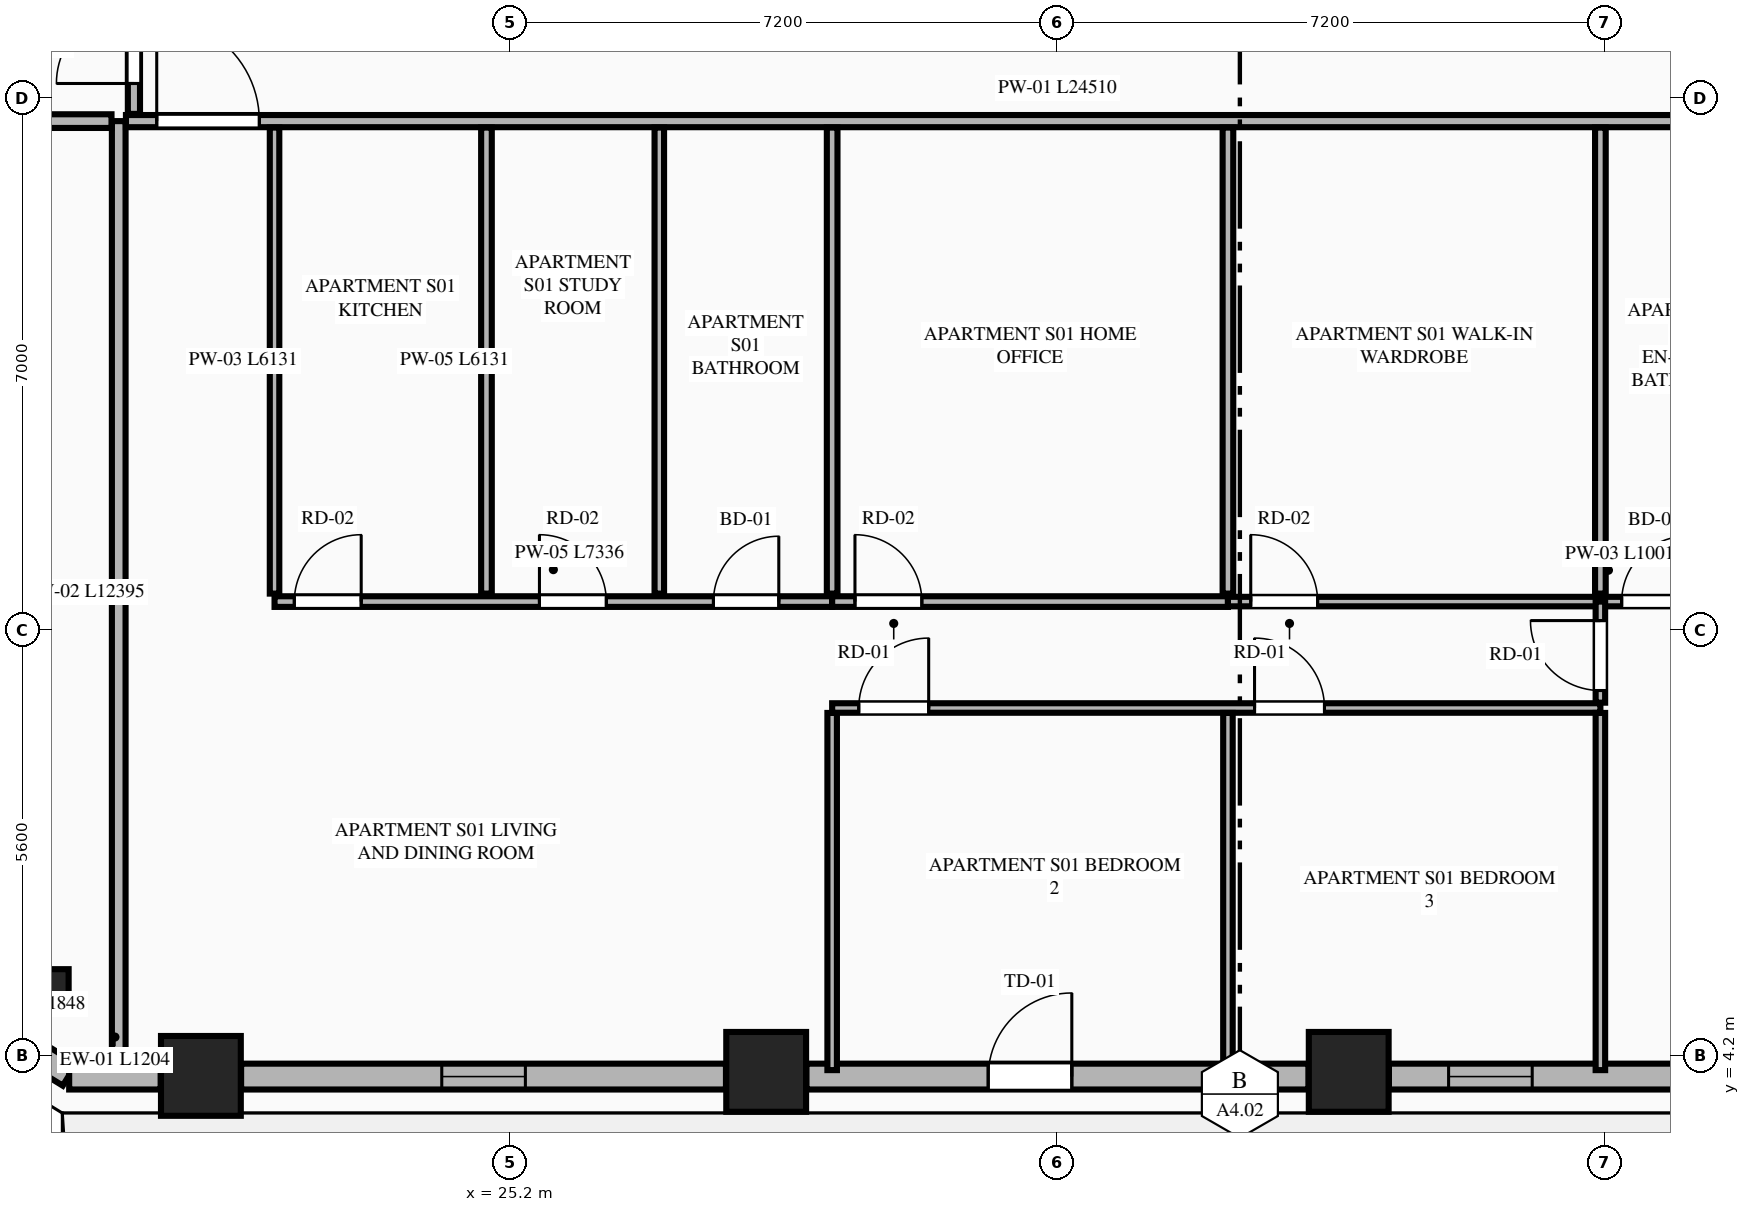
"""IFC4 building model, lengths in metres.
Left out: names, types, materials, properties, quantities, classifications, styles, units other than length and angle.
Written with IfcOpenShell. Run it as: python <this file> out.ifc"""

import sys

from ifc_helpers import new_model, si_unit, direction, frame, frame_2d, origin, origin_2d, place, context, subcontext, project, spatial, rectangle, extrude, element, fill, save


model = new_model("IFC4")
c1 = context("Model", 3, precision=1e-05, world=origin(), true_north=direction((0.0, 1.0)))
c2 = subcontext(c1, "Body", "Model", "MODEL_VIEW")
j1 = project(units=[si_unit("LENGTHUNIT", "METRE"), si_unit("PLANEANGLEUNIT", "RADIAN")], contexts=[c1])
p1 = place(None, origin())
s1 = spatial("IfcSite", under=j1, at=p1, CompositionType="ELEMENT")
p2 = place(p1, origin())
s2 = spatial("IfcBuilding", under=s1, at=p2, CompositionType="ELEMENT")
p3 = place(p2, frame((0.0, 0.0, 119.7)))
s3 = spatial("IfcBuildingStorey", under=s2, at=p3, CompositionType="ELEMENT", Elevation=119.7)
for number, where, z_axis, x_axis in (
    (1, (21.131, 3.939, 0.0), (0.0, 0.0, 1.0), (1.0, 0.0, 0.0)),
    (2, (28.568, 3.992, 0.0), (0.0, 0.0, 1.0), (1.0, 0.0, 0.0)),
    (3, (36.232, 3.992, 0.0), (0.0, 0.0, 1.0), (1.0, 0.0, 0.0)),
):
    element("IfcColumn", number, at=place(p3, frame(where, z_axis=z_axis, x_axis=x_axis)), inside=s3, PredefinedType="COLUMN", context=c2, shape_type="SweptSolid", body=[
        extrude(rectangle(XDim=1.05, YDim=1.05, at=origin_2d()), origin(), (0.0, 0.0, 1.0), 3.55),
    ])
p4 = place(p3, frame((19.141, 5.093, 0.0), z_axis=(0.0, 0.0, 1.0), x_axis=(0.865160173452, -0.501495637342, 0.0)))
e4 = element("IfcColumn", 4, at=p4, inside=s3, PredefinedType="PILASTER", context=c2, shape_type="SweptSolid", body=[
    extrude(rectangle(XDim=0.5, YDim=0.35, at=origin_2d()), origin(), (0.0, 0.0, 1.0), 3.55),
])
p5 = place(p3, frame((17.829, 4.923, 0.0), z_axis=(0.0, 0.0, 1.0), x_axis=(0.851798915137, -0.523868884523, 0.0)))
e5 = element("IfcWall", 5, at=p5, inside=s3, PredefinedType="STANDARD", context=c2, shape_type="SweptSolid", body=[
    extrude(rectangle(XDim=1.848, YDim=0.34, at=frame_2d((0.924, 0.0))), origin(), (0.0, 0.0, 1.0), 3.34),
])
p6 = place(p3, frame((19.398, 3.93, 0.0), z_axis=(0.0, 0.0, 1.0), x_axis=(1.0, 0.0, 0.0)))
e6 = element("IfcWall", 6, at=p6, inside=s3, PredefinedType="STANDARD", context=c2, shape_type="SweptSolid", body=[
    extrude(rectangle(XDim=1.204, YDim=0.34, at=frame_2d((0.602, 0.0))), origin(), (0.0, 0.0, 1.0), 3.34),
])
p7 = place(p3, frame((21.66, 3.93, 0.0), z_axis=(0.0, 0.0, 1.0), x_axis=(1.0, 0.0, 0.0)))
e7 = element("IfcWall", 7, at=p7, inside=s3, PredefinedType="STANDARD", context=c2, shape_type="SweptSolid", body=[
    extrude(rectangle(XDim=6.379, YDim=0.34, at=frame_2d((3.189, 0.0))), origin(), (0.0, 0.0, 1.0), 2.797),
])
p8 = place(p7, frame((2.64, 0.0, 0.75)))
e8 = element("IfcOpeningElement", 8, at=p8, cuts=e7, PredefinedType="OPENING", context=c2, shape_type="SweptSolid", body=[
    extrude(rectangle(XDim=1.1, YDim=1.897, at=frame_2d((0.55, 0.948))), frame((0.0, 0.18, 0.0), z_axis=(0.0, -1.0, 0.0), x_axis=(1.0, 0.0, 0.0)), (0.0, 0.0, 1.0), 0.36),
])
p9 = place(p3, frame((29.097, 3.93, 0.0), z_axis=(0.0, 0.0, 1.0), x_axis=(1.0, 0.0, 0.0)))
e9 = element("IfcWall", 9, at=p9, inside=s3, PredefinedType="STANDARD", context=c2, shape_type="SweptSolid", body=[
    extrude(rectangle(XDim=6.606, YDim=0.34, at=frame_2d((3.303, 0.0))), origin(), (0.0, 0.0, 1.0), 2.797),
])
p10 = place(p9, frame((2.392, 0.0, 0.0)))
e10 = element("IfcOpeningElement", 10, at=p10, cuts=e9, PredefinedType="OPENING", context=c2, shape_type="SweptSolid", body=[
    extrude(rectangle(XDim=1.1, YDim=2.25, at=frame_2d((0.55, 1.125))), frame((0.0, 0.18, 0.0), z_axis=(0.0, -1.0, 0.0), x_axis=(1.0, 0.0, 0.0)), (0.0, 0.0, 1.0), 0.36),
])
p11 = place(p3, frame((36.761, 3.93, 0.0), z_axis=(0.0, 0.0, 1.0), x_axis=(1.0, 0.0, 0.0)))
e11 = element("IfcWall", 11, at=p11, inside=s3, PredefinedType="STANDARD", context=c2, shape_type="SweptSolid", body=[
    extrude(rectangle(XDim=6.379, YDim=0.34, at=frame_2d((3.189, 0.0))), origin(), (0.0, 0.0, 1.0), 2.797),
])
p12 = place(p11, frame((0.785, 0.0, 0.75)))
e12 = element("IfcOpeningElement", 12, at=p12, cuts=e11, PredefinedType="OPENING", context=c2, shape_type="SweptSolid", body=[
    extrude(rectangle(XDim=1.1, YDim=1.897, at=frame_2d((0.55, 0.948))), frame((0.0, 0.18, 0.0), z_axis=(0.0, -1.0, 0.0), x_axis=(1.0, 0.0, 0.0)), (0.0, 0.0, 1.0), 0.36),
])
p13 = place(p11, frame((4.087, 0.0, 0.75)))
e13 = element("IfcOpeningElement", 13, at=p13, cuts=e11, PredefinedType="OPENING", context=c2, shape_type="SweptSolid", body=[
    extrude(rectangle(XDim=1.1, YDim=1.897, at=frame_2d((0.55, 0.948))), frame((0.0, 0.18, 0.0), z_axis=(0.0, -1.0, 0.0), x_axis=(1.0, 0.0, 0.0)), (0.0, 0.0, 1.0), 0.36),
])
p14 = place(p3, frame((20.05, 4.105, 0.0), z_axis=(0.0, 0.0, 1.0), x_axis=(0.0, 1.0, 0.0)))
e14 = element("IfcWall", 14, at=p14, inside=s3, PredefinedType="PARTITIONING", context=c2, shape_type="SweptSolid", body=[
    extrude(rectangle(XDim=12.395, YDim=0.18, at=frame_2d((6.198, 0.0))), origin(), (0.0, 0.0, 1.0), 3.34),
])
p15 = place(p3, frame((20.145, 16.5, 0.0), z_axis=(0.0, 0.0, 1.0), x_axis=(1.0, 0.0, 0.0)))
e15 = element("IfcWall", 15, at=p15, inside=s3, PredefinedType="PARTITIONING", context=c2, shape_type="SweptSolid", body=[
    extrude(rectangle(XDim=24.51, YDim=0.16, at=frame_2d((12.255, 0.0))), origin(), (0.0, 0.0, 1.0), 3.34),
])
p16 = place(p15, frame((0.405, 0.0, 0.0)))
e16 = element("IfcOpeningElement", 16, at=p16, cuts=e15, PredefinedType="OPENING", context=c2, shape_type="SweptSolid", body=[
    extrude(rectangle(XDim=1.35, YDim=2.35, at=frame_2d((0.675, 1.175))), frame((0.0, 0.09, 0.0), z_axis=(0.0, -1.0, 0.0), x_axis=(1.0, 0.0, 0.0)), (0.0, 0.0, 1.0), 0.18),
])
p17 = place(p3, frame((22.1, 10.284, 0.0), z_axis=(0.0, 0.0, 1.0), x_axis=(0.0, 1.0, 0.0)))
e17 = element("IfcWall", 17, at=p17, inside=s3, PredefinedType="PARTITIONING", context=c2, shape_type="SweptSolid", body=[
    extrude(rectangle(XDim=6.131, YDim=0.125, at=frame_2d((3.065, 0.0))), origin(), (0.0, 0.0, 1.0), 2.722),
])
p18 = place(p3, frame((22.1, 10.179, 0.0), z_axis=(0.0, 0.0, 1.0), x_axis=(1.0, 0.0, 0.0)))
e18 = element("IfcWall", 18, at=p18, inside=s3, PredefinedType="PLUMBINGWALL", context=c2, shape_type="SweptSolid", body=[
    extrude(rectangle(XDim=7.336, YDim=0.14, at=frame_2d((3.668, 0.0))), origin(), (0.0, 0.0, 1.0), 3.34),
])
p19 = place(p18, frame((5.774, 0.0, 0.0)))
e19 = element("IfcOpeningElement", 19, at=p19, cuts=e18, PredefinedType="OPENING", context=c2, shape_type="SweptSolid", body=[
    extrude(rectangle(XDim=0.86, YDim=2.1, at=frame_2d((0.43, 1.05))), frame((0.0, 0.08, 0.0), z_axis=(0.0, -1.0, 0.0), x_axis=(1.0, 0.0, 0.0)), (0.0, 0.0, 1.0), 0.16),
])
p20 = place(p18, frame((0.26, 0.0, 0.0)))
e20 = element("IfcOpeningElement", 20, at=p20, cuts=e18, PredefinedType="OPENING", context=c2, shape_type="SweptSolid", body=[
    extrude(rectangle(XDim=0.88, YDim=2.15, at=frame_2d((0.44, 1.075))), frame((0.0, 0.08, 0.0), z_axis=(0.0, -1.0, 0.0), x_axis=(1.0, 0.0, 0.0)), (0.0, 0.0, 1.0), 0.16),
])
p21 = place(p18, frame((3.485, 0.0, 0.0)))
e21 = element("IfcOpeningElement", 21, at=p21, cuts=e18, PredefinedType="OPENING", context=c2, shape_type="SweptSolid", body=[
    extrude(rectangle(XDim=0.88, YDim=2.15, at=frame_2d((0.44, 1.075))), frame((0.0, 0.08, 0.0), z_axis=(0.0, -1.0, 0.0), x_axis=(1.0, 0.0, 0.0)), (0.0, 0.0, 1.0), 0.16),
])
p22 = place(p3, frame((29.436, 10.179, 0.0), z_axis=(0.0, 0.0, 1.0), x_axis=(1.0, 0.0, 0.0)))
e22 = element("IfcWall", 22, at=p22, inside=s3, PredefinedType="PLUMBINGWALL", context=c2, shape_type="SweptSolid", body=[
    extrude(rectangle(XDim=5.207, YDim=0.14, at=frame_2d((2.604, 0.0))), origin(), (0.0, 0.0, 1.0), 3.34),
])
p23 = place(p22, frame((0.3, 0.0, 0.0)))
e23 = element("IfcOpeningElement", 23, at=p23, cuts=e22, PredefinedType="OPENING", context=c2, shape_type="SweptSolid", body=[
    extrude(rectangle(XDim=0.88, YDim=2.15, at=frame_2d((0.44, 1.075))), frame((0.0, 0.08, 0.0), z_axis=(0.0, -1.0, 0.0), x_axis=(1.0, 0.0, 0.0)), (0.0, 0.0, 1.0), 0.16),
])
p24 = place(p3, frame((34.643, 10.179, 0.0), z_axis=(0.0, 0.0, 1.0), x_axis=(1.0, 0.0, 0.0)))
e24 = element("IfcWall", 24, at=p24, inside=s3, PredefinedType="PARTITIONING", context=c2, shape_type="SweptSolid", body=[
    extrude(rectangle(XDim=10.012, YDim=0.125, at=frame_2d((5.006, 0.0))), origin(), (0.0, 0.0, 1.0), 3.34),
])
p25 = place(p24, frame((5.18, 0.0, 0.0)))
e25 = element("IfcOpeningElement", 25, at=p25, cuts=e24, PredefinedType="OPENING", context=c2, shape_type="SweptSolid", body=[
    extrude(rectangle(XDim=0.86, YDim=2.1, at=frame_2d((0.43, 1.05))), frame((0.0, 0.073, 0.0), z_axis=(0.0, -1.0, 0.0), x_axis=(1.0, 0.0, 0.0)), (0.0, 0.0, 1.0), 0.145),
])
p26 = place(p24, frame((7.42, 0.0, 0.0)))
e26 = element("IfcOpeningElement", 26, at=p26, cuts=e24, PredefinedType="OPENING", context=c2, shape_type="SweptSolid", body=[
    extrude(rectangle(XDim=0.88, YDim=2.15, at=frame_2d((0.44, 1.075))), frame((0.0, 0.073, 0.0), z_axis=(0.0, -1.0, 0.0), x_axis=(1.0, 0.0, 0.0)), (0.0, 0.0, 1.0), 0.145),
])
p27 = place(p24, frame((0.3, 0.0, 0.0)))
e27 = element("IfcOpeningElement", 27, at=p27, cuts=e24, PredefinedType="OPENING", context=c2, shape_type="SweptSolid", body=[
    extrude(rectangle(XDim=0.88, YDim=2.15, at=frame_2d((0.44, 1.075))), frame((0.0, 0.073, 0.0), z_axis=(0.0, -1.0, 0.0), x_axis=(1.0, 0.0, 0.0)), (0.0, 0.0, 1.0), 0.145),
])
p28 = place(p3, frame((24.888, 10.284, 0.0), z_axis=(0.0, 0.0, 1.0), x_axis=(0.0, 1.0, 0.0)))
e28 = element("IfcWall", 28, at=p28, inside=s3, PredefinedType="PLUMBINGWALL", context=c2, shape_type="SweptSolid", body=[
    extrude(rectangle(XDim=6.131, YDim=0.14, at=frame_2d((3.065, 0.0))), origin(), (0.0, 0.0, 1.0), 3.34),
])
p29 = place(p3, frame((27.162, 10.284, 0.0), z_axis=(0.0, 0.0, 1.0), x_axis=(0.0, 1.0, 0.0)))
e29 = element("IfcWall", 29, at=p29, inside=s3, PredefinedType="PARTITIONING", context=c2, shape_type="SweptSolid", body=[
    extrude(rectangle(XDim=6.131, YDim=0.125, at=frame_2d((3.065, 0.0))), origin(), (0.0, 0.0, 1.0), 3.34),
])
p30 = place(p3, frame((29.436, 4.015, 0.0), z_axis=(0.0, 0.0, 1.0), x_axis=(0.0, 1.0, 0.0)))
e30 = element("IfcWall", 30, at=p30, inside=s3, PredefinedType="PARTITIONING", context=c2, shape_type="SweptSolid", body=[
    extrude(rectangle(XDim=4.699, YDim=0.125, at=frame_2d((2.35, 0.0))), origin(), (0.0, 0.0, 1.0), 3.34),
])
p31 = place(p3, frame((29.436, 8.779, 0.0), z_axis=(0.0, 0.0, 1.0), x_axis=(1.0, 0.0, 0.0)))
e31 = element("IfcWall", 31, at=p31, inside=s3, PredefinedType="PARTITIONING", context=c2, shape_type="SweptSolid", body=[
    extrude(rectangle(XDim=10.107, YDim=0.125, at=frame_2d((5.053, 0.0))), origin(), (0.0, 0.0, 1.0), 3.34),
])
p32 = place(p31, frame((0.35, 0.0, 0.0)))
e32 = element("IfcOpeningElement", 32, at=p32, cuts=e31, PredefinedType="OPENING", context=c2, shape_type="SweptSolid", body=[
    extrude(rectangle(XDim=0.92, YDim=2.15, at=frame_2d((0.46, 1.075))), frame((0.0, 0.073, 0.0), z_axis=(0.0, -1.0, 0.0), x_axis=(1.0, 0.0, 0.0)), (0.0, 0.0, 1.0), 0.145),
])
p33 = place(p31, frame((5.557, 0.0, 0.0)))
e33 = element("IfcOpeningElement", 33, at=p33, cuts=e31, PredefinedType="OPENING", context=c2, shape_type="SweptSolid", body=[
    extrude(rectangle(XDim=0.92, YDim=2.15, at=frame_2d((0.46, 1.075))), frame((0.0, 0.073, 0.0), z_axis=(0.0, -1.0, 0.0), x_axis=(1.0, 0.0, 0.0)), (0.0, 0.0, 1.0), 0.145),
])
p34 = place(p3, frame((39.543, 8.849, 0.0), z_axis=(0.0, 0.0, 1.0), x_axis=(0.0, 1.0, 0.0)))
e34 = element("IfcWall", 34, at=p34, inside=s3, PredefinedType="PARTITIONING", context=c2, shape_type="SweptSolid", body=[
    extrude(rectangle(XDim=1.33, YDim=0.125, at=frame_2d((0.665, 0.0))), origin(), (0.0, 0.0, 1.0), 3.34),
])
p35 = place(p34, frame((0.16, 0.0, 0.0)))
e35 = element("IfcOpeningElement", 35, at=p35, cuts=e34, PredefinedType="OPENING", context=c2, shape_type="SweptSolid", body=[
    extrude(rectangle(XDim=0.92, YDim=2.15, at=frame_2d((0.46, 1.075))), frame((0.0, 0.073, 0.0), z_axis=(0.0, -1.0, 0.0), x_axis=(1.0, 0.0, 0.0)), (0.0, 0.0, 1.0), 0.145),
])
for number, where, z_axis, x_axis in (
    (36, (29.436, 10.284, 0.0), (0.0, 0.0, 1.0), (0.0, 1.0, 0.0)),
    (37, (34.643, 10.284, 0.0), (0.0, 0.0, 1.0), (0.0, 1.0, 0.0)),
):
    element("IfcWall", number, at=place(p3, frame(where, z_axis=z_axis, x_axis=x_axis)), inside=s3, PredefinedType="PLUMBINGWALL", context=c2, shape_type="SweptSolid", body=[
        extrude(rectangle(XDim=6.131, YDim=0.14, at=frame_2d((3.065, 0.0))), origin(), (0.0, 0.0, 1.0), 3.34),
    ])
for number, where, z_axis, x_axis in (
    (38, (34.643, 4.015, 0.0), (0.0, 0.0, 1.0), (0.0, 1.0, 0.0)),
    (39, (39.543, 4.015, 0.0), (0.0, 0.0, 1.0), (0.0, 1.0, 0.0)),
):
    element("IfcWall", number, at=place(p3, frame(where, z_axis=z_axis, x_axis=x_axis)), inside=s3, PredefinedType="PARTITIONING", context=c2, shape_type="SweptSolid", body=[
        extrude(rectangle(XDim=4.699, YDim=0.125, at=frame_2d((2.35, 0.0))), origin(), (0.0, 0.0, 1.0), 3.34),
    ])
p36 = place(p3, frame((39.543, 10.284, 0.0), z_axis=(0.0, 0.0, 1.0), x_axis=(0.0, 1.0, 0.0)))
e40 = element("IfcWall", 40, at=p36, inside=s3, PredefinedType="PLUMBINGWALL", context=c2, shape_type="SweptSolid", body=[
    extrude(rectangle(XDim=6.131, YDim=0.14, at=frame_2d((3.065, 0.0))), origin(), (0.0, 0.0, 1.0), 3.34),
])
p37 = place(p3, frame((12.185, 16.5, 0.0), z_axis=(0.0, 0.0, 1.0), x_axis=(1.0, 0.0, 0.0)))
e41 = element("IfcWall", 41, at=p37, inside=s3, PredefinedType="PARTITIONING", context=c2, shape_type="SweptSolid", body=[
    extrude(rectangle(XDim=7.77, YDim=0.18, at=frame_2d((3.885, 0.0))), origin(), (0.0, 0.0, 1.0), 3.34),
])
p38 = place(p3, frame((20.25, 16.595, 0.0), z_axis=(0.0, 0.0, 1.0), x_axis=(0.0, 1.0, 0.0)))
e42 = element("IfcWall", 42, at=p38, inside=s3, PredefinedType="PARTITIONING", context=c2, shape_type="SweptSolid", body=[
    extrude(rectangle(XDim=6.202, YDim=0.16, at=frame_2d((3.101, 0.0))), origin(), (0.0, 0.0, 1.0), 3.34),
])
p39 = place(p38, frame((0.4, 0.0, 0.0)))
e43 = element("IfcOpeningElement", 43, at=p39, cuts=e42, PredefinedType="OPENING", context=c2, shape_type="SweptSolid", body=[
    extrude(rectangle(XDim=1.02, YDim=2.25, at=frame_2d((0.51, 1.125))), frame((0.0, 0.09, 0.0), z_axis=(0.0, -1.0, 0.0), x_axis=(1.0, 0.0, 0.0)), (0.0, 0.0, 1.0), 0.18),
])
p40 = place(p8, origin())
e44 = element("IfcWindow", 44, at=p40, inside=s3, PartitioningType="SINGLE_PANEL", PredefinedType="WINDOW", context=c2, shape_type="SweptSolid", body=[
    extrude(rectangle(XDim=1.1, YDim=1.897, at=frame_2d((0.55, 0.948))), frame((0.0, 0.03, 0.0), z_axis=(0.0, -1.0, 0.0), x_axis=(1.0, 0.0, 0.0)), (0.0, 0.0, 1.0), 0.06),
])
fill(e8, e44)
p41 = place(p10, origin())
e45 = element("IfcDoor", 45, at=p41, inside=s3, OperationType="SINGLE_SWING_RIGHT", PredefinedType="DOOR", context=c2, shape_type="SweptSolid", body=[
    extrude(rectangle(XDim=1.1, YDim=2.25, at=frame_2d((0.55, 1.125))), frame((0.0, 0.025, 0.0), z_axis=(0.0, -1.0, 0.0), x_axis=(1.0, 0.0, 0.0)), (0.0, 0.0, 1.0), 0.05),
])
fill(e10, e45)
p42 = place(p12, origin())
e46 = element("IfcWindow", 46, at=p42, inside=s3, PartitioningType="SINGLE_PANEL", PredefinedType="WINDOW", context=c2, shape_type="SweptSolid", body=[
    extrude(rectangle(XDim=1.1, YDim=1.897, at=frame_2d((0.55, 0.948))), frame((0.0, 0.03, 0.0), z_axis=(0.0, -1.0, 0.0), x_axis=(1.0, 0.0, 0.0)), (0.0, 0.0, 1.0), 0.06),
])
fill(e12, e46)
p43 = place(p19, origin())
e47 = element("IfcDoor", 47, at=p43, inside=s3, OperationType="SINGLE_SWING_RIGHT", PredefinedType="DOOR", context=c2, shape_type="SweptSolid", body=[
    extrude(rectangle(XDim=0.86, YDim=2.1, at=frame_2d((0.43, 1.05))), frame((0.0, 0.025, 0.0), z_axis=(0.0, -1.0, 0.0), x_axis=(1.0, 0.0, 0.0)), (0.0, 0.0, 1.0), 0.05),
])
fill(e19, e47)
p44 = place(p25, origin())
e48 = element("IfcDoor", 48, at=p44, inside=s3, OperationType="SINGLE_SWING_RIGHT", PredefinedType="DOOR", context=c2, shape_type="SweptSolid", body=[
    extrude(rectangle(XDim=0.86, YDim=2.1, at=frame_2d((0.43, 1.05))), frame((0.0, 0.025, 0.0), z_axis=(0.0, -1.0, 0.0), x_axis=(1.0, 0.0, 0.0)), (0.0, 0.0, 1.0), 0.05),
])
fill(e25, e48)
p45 = place(p16, origin())
e49 = element("IfcDoor", 49, at=p45, inside=s3, OperationType="SINGLE_SWING_LEFT", PredefinedType="DOOR", context=c2, shape_type="SweptSolid", body=[
    extrude(rectangle(XDim=1.35, YDim=2.35, at=frame_2d((0.675, 1.175))), frame((0.0, 0.025, 0.0), z_axis=(0.0, -1.0, 0.0), x_axis=(1.0, 0.0, 0.0)), (0.0, 0.0, 1.0), 0.05),
])
fill(e16, e49)
p46 = place(p20, origin())
e50 = element("IfcDoor", 50, at=p46, inside=s3, OperationType="SINGLE_SWING_RIGHT", PredefinedType="DOOR", context=c2, shape_type="SweptSolid", body=[
    extrude(rectangle(XDim=0.88, YDim=2.15, at=frame_2d((0.44, 1.075))), frame((0.0, 0.025, 0.0), z_axis=(0.0, -1.0, 0.0), x_axis=(1.0, 0.0, 0.0)), (0.0, 0.0, 1.0), 0.05),
])
fill(e20, e50)
p47 = place(p21, origin())
e51 = element("IfcDoor", 51, at=p47, inside=s3, OperationType="SINGLE_SWING_LEFT", PredefinedType="DOOR", context=c2, shape_type="SweptSolid", body=[
    extrude(rectangle(XDim=0.88, YDim=2.15, at=frame_2d((0.44, 1.075))), frame((0.0, 0.025, 0.0), z_axis=(0.0, -1.0, 0.0), x_axis=(1.0, 0.0, 0.0)), (0.0, 0.0, 1.0), 0.05),
])
fill(e21, e51)
p48 = place(p23, origin())
e52 = element("IfcDoor", 52, at=p48, inside=s3, OperationType="SINGLE_SWING_LEFT", PredefinedType="DOOR", context=c2, shape_type="SweptSolid", body=[
    extrude(rectangle(XDim=0.88, YDim=2.15, at=frame_2d((0.44, 1.075))), frame((0.0, 0.025, 0.0), z_axis=(0.0, -1.0, 0.0), x_axis=(1.0, 0.0, 0.0)), (0.0, 0.0, 1.0), 0.05),
])
fill(e23, e52)
p49 = place(p32, origin())
e53 = element("IfcDoor", 53, at=p49, inside=s3, OperationType="SINGLE_SWING_RIGHT", PredefinedType="DOOR", context=c2, shape_type="SweptSolid", body=[
    extrude(rectangle(XDim=0.92, YDim=2.15, at=frame_2d((0.46, 1.075))), frame((0.0, 0.025, 0.0), z_axis=(0.0, -1.0, 0.0), x_axis=(1.0, 0.0, 0.0)), (0.0, 0.0, 1.0), 0.05),
])
fill(e32, e53)
p50 = place(p33, origin())
e54 = element("IfcDoor", 54, at=p50, inside=s3, OperationType="SINGLE_SWING_LEFT", PredefinedType="DOOR", context=c2, shape_type="SweptSolid", body=[
    extrude(rectangle(XDim=0.92, YDim=2.15, at=frame_2d((0.46, 1.075))), frame((0.0, 0.025, 0.0), z_axis=(0.0, -1.0, 0.0), x_axis=(1.0, 0.0, 0.0)), (0.0, 0.0, 1.0), 0.05),
])
fill(e33, e54)
p51 = place(p35, origin())
e55 = element("IfcDoor", 55, at=p51, inside=s3, OperationType="SINGLE_SWING_RIGHT", PredefinedType="DOOR", context=c2, shape_type="SweptSolid", body=[
    extrude(rectangle(XDim=0.92, YDim=2.15, at=frame_2d((0.46, 1.075))), frame((0.0, 0.025, 0.0), z_axis=(0.0, -1.0, 0.0), x_axis=(1.0, 0.0, 0.0)), (0.0, 0.0, 1.0), 0.05),
])
fill(e35, e55)
p52 = place(p27, origin())
e56 = element("IfcDoor", 56, at=p52, inside=s3, OperationType="SINGLE_SWING_LEFT", PredefinedType="DOOR", context=c2, shape_type="SweptSolid", body=[
    extrude(rectangle(XDim=0.88, YDim=2.15, at=frame_2d((0.44, 1.075))), frame((0.0, 0.025, 0.0), z_axis=(0.0, -1.0, 0.0), x_axis=(1.0, 0.0, 0.0)), (0.0, 0.0, 1.0), 0.05),
])
fill(e27, e56)
p53 = place(p39, origin())
e57 = element("IfcDoor", 57, at=p53, inside=s3, OperationType="SINGLE_SWING_LEFT", PredefinedType="DOOR", context=c2, shape_type="SweptSolid", body=[
    extrude(rectangle(XDim=1.02, YDim=2.25, at=frame_2d((0.51, 1.125))), frame((0.0, 0.025, 0.0), z_axis=(0.0, -1.0, 0.0), x_axis=(1.0, 0.0, 0.0)), (0.0, 0.0, 1.0), 0.05),
])
fill(e43, e57)
save(model, sys.argv[1])
